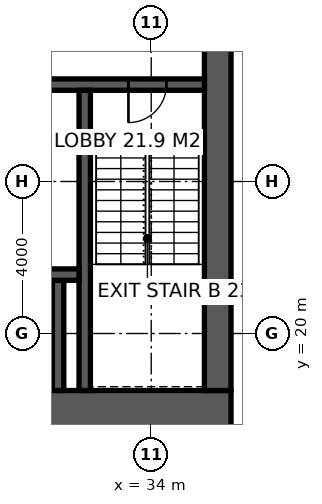
"""IFC4 building model, lengths in metres.
Left out: names, types, materials, properties, quantities, classifications, styles, units other than length and angle.
Written with IfcOpenShell. Run it as: python <this file> out.ifc"""

import sys

from ifc_helpers import new_model, si_unit, direction, frame, frame_2d, origin, place, context, subcontext, project, spatial, rectangle, extrude, element, fill, save


model = new_model("IFC4")
c1 = context("Model", 3, precision=1e-05, world=origin(), true_north=direction((0.0, 1.0)))
c2 = subcontext(c1, "Body", "Model", "MODEL_VIEW")
j1 = project(units=[si_unit("LENGTHUNIT", "METRE"), si_unit("PLANEANGLEUNIT", "RADIAN")], contexts=[c1])
p1 = place(None, origin())
s1 = spatial("IfcSite", under=j1, at=p1, CompositionType="ELEMENT")
p2 = place(p1, origin())
s2 = spatial("IfcBuilding", under=s1, at=p2, CompositionType="ELEMENT")
p3 = place(p2, frame((0.0, 0.0, 274.2)))
s3 = spatial("IfcBuildingStorey", under=s2, at=p3, CompositionType="ELEMENT", Elevation=274.2)
p4 = place(p3, frame((18.5, 18.0, -0.15), z_axis=(0.0, 0.0, 1.0), x_axis=(1.0, 0.0, 0.0)))
e1 = element("IfcWall", 1, at=p4, inside=s3, PredefinedType="SHEAR", context=c2, shape_type="SweptSolid", body=[
    extrude(rectangle(XDim=17.6, YDim=1.0, at=frame_2d((8.8, 0.0))), origin(), (0.0, 0.0, 1.0), 4.0),
])
p5 = place(p4, frame((3.45, 0.0, 0.15)))
e2 = element("IfcOpeningElement", 2, at=p5, cuts=e1, PredefinedType="OPENING", context=c2, shape_type="SweptSolid", body=[
    extrude(rectangle(XDim=1.5, YDim=2.4, at=frame_2d((0.75, 1.2))), frame((0.0, 0.51, 0.0), z_axis=(0.0, -1.0, 0.0), x_axis=(1.0, 0.0, 0.0)), (0.0, 0.0, 1.0), 1.02),
])
p6 = place(p3, frame((35.75, 18.5, -0.15), z_axis=(0.0, 0.0, 1.0), x_axis=(0.0, 1.0, 0.0)))
e3 = element("IfcWall", 3, at=p6, inside=s3, PredefinedType="SHEAR", context=c2, shape_type="SweptSolid", body=[
    extrude(rectangle(XDim=17.0, YDim=0.7, at=frame_2d((8.5, 0.0))), origin(), (0.0, 0.0, 1.0), 4.0),
])
p7 = place(p6, frame((9.85, 0.0, 0.15)))
e4 = element("IfcOpeningElement", 4, at=p7, cuts=e3, PredefinedType="OPENING", context=c2, shape_type="SweptSolid", body=[
    extrude(rectangle(XDim=1.0, YDim=2.2, at=frame_2d((0.5, 1.1))), frame((0.0, 0.36, 0.0), z_axis=(0.0, -1.0, 0.0), x_axis=(1.0, 0.0, 0.0)), (0.0, 0.0, 1.0), 0.72),
])
p8 = place(p3, frame((24.15, 26.55, -0.15), z_axis=(0.0, 0.0, 1.0), x_axis=(1.0, 0.0, 0.0)))
e5 = element("IfcWall", 5, at=p8, inside=s3, PredefinedType="SHEAR", context=c2, shape_type="SweptSolid", body=[
    extrude(rectangle(XDim=11.25, YDim=0.3, at=frame_2d((5.625, 0.0))), origin(), (0.0, 0.0, 1.0), 4.0),
])
p9 = place(p8, frame((9.25, 0.0, 0.15)))
e6 = element("IfcOpeningElement", 6, at=p9, cuts=e5, PredefinedType="OPENING", context=c2, shape_type="SweptSolid", body=[
    extrude(rectangle(XDim=1.0, YDim=2.2, at=frame_2d((0.5, 1.1))), frame((0.0, 0.16, 0.0), z_axis=(0.0, -1.0, 0.0), x_axis=(1.0, 0.0, 0.0)), (0.0, 0.0, 1.0), 0.32),
])
p10 = place(p8, frame((4.9, 0.0, 0.15)))
e7 = element("IfcOpeningElement", 7, at=p10, cuts=e5, PredefinedType="OPENING", context=c2, shape_type="SweptSolid", body=[
    extrude(rectangle(XDim=1.5, YDim=2.4, at=frame_2d((0.75, 1.2))), frame((0.0, 0.16, 0.0), z_axis=(0.0, -1.0, 0.0), x_axis=(1.0, 0.0, 0.0)), (0.0, 0.0, 1.0), 0.32),
])
p11 = place(p3, frame((32.25, 18.5, -0.15), z_axis=(0.0, 0.0, 1.0), x_axis=(0.0, 1.0, 0.0)))
e8 = element("IfcWall", 8, at=p11, inside=s3, PredefinedType="SHEAR", context=c2, shape_type="SweptSolid", body=[
    extrude(rectangle(XDim=7.9, YDim=0.3, at=frame_2d((3.95, 0.0))), origin(), (0.0, 0.0, 1.0), 4.0),
])
p12 = place(p3, frame((31.55, 18.5, -0.15), z_axis=(0.0, 0.0, 1.0), x_axis=(0.0, 1.0, 0.0)))
e9 = element("IfcWall", 9, at=p12, inside=s3, PredefinedType="SHEAR", context=c2, shape_type="SweptSolid", body=[
    extrude(rectangle(XDim=2.9, YDim=0.3, at=frame_2d((1.45, 0.0))), origin(), (0.0, 0.0, 1.0), 4.0),
])
p13 = place(p3, frame((28.3, 21.55, -0.15), z_axis=(0.0, 0.0, 1.0), x_axis=(1.0, 0.0, 0.0)))
e10 = element("IfcWall", 10, at=p13, inside=s3, PredefinedType="SHEAR", context=c2, shape_type="SweptSolid", body=[
    extrude(rectangle(XDim=3.8, YDim=0.3, at=frame_2d((1.9, 0.0))), origin(), (0.0, 0.0, 1.0), 4.0),
])
p14 = place(p13, frame((1.05, 0.0, 0.15)))
e11 = element("IfcOpeningElement", 11, at=p14, cuts=e10, PredefinedType="OPENING", context=c2, shape_type="SweptSolid", body=[
    extrude(rectangle(XDim=1.3, YDim=2.4, at=frame_2d((0.65, 1.2))), frame((0.0, 0.16, 0.0), z_axis=(0.0, -1.0, 0.0), x_axis=(1.0, 0.0, 0.0)), (0.0, 0.0, 1.0), 0.32),
])
p15 = place(p9, frame((1.0, 0.0, 0.0), z_axis=(0.0, 0.0, 1.0), x_axis=(-1.0, 0.0, 0.0)))
e12 = element("IfcDoor", 12, at=p15, inside=s3, OperationType="SINGLE_SWING_RIGHT", PredefinedType="DOOR", context=c2, shape_type="SweptSolid", body=[
    extrude(rectangle(XDim=1.0, YDim=2.2, at=frame_2d((0.5, 1.1))), frame((0.0, 0.025, 0.0), z_axis=(0.0, -1.0, 0.0), x_axis=(1.0, 0.0, 0.0)), (0.0, 0.0, 1.0), 0.05),
])
fill(e6, e12)
save(model, sys.argv[1])
